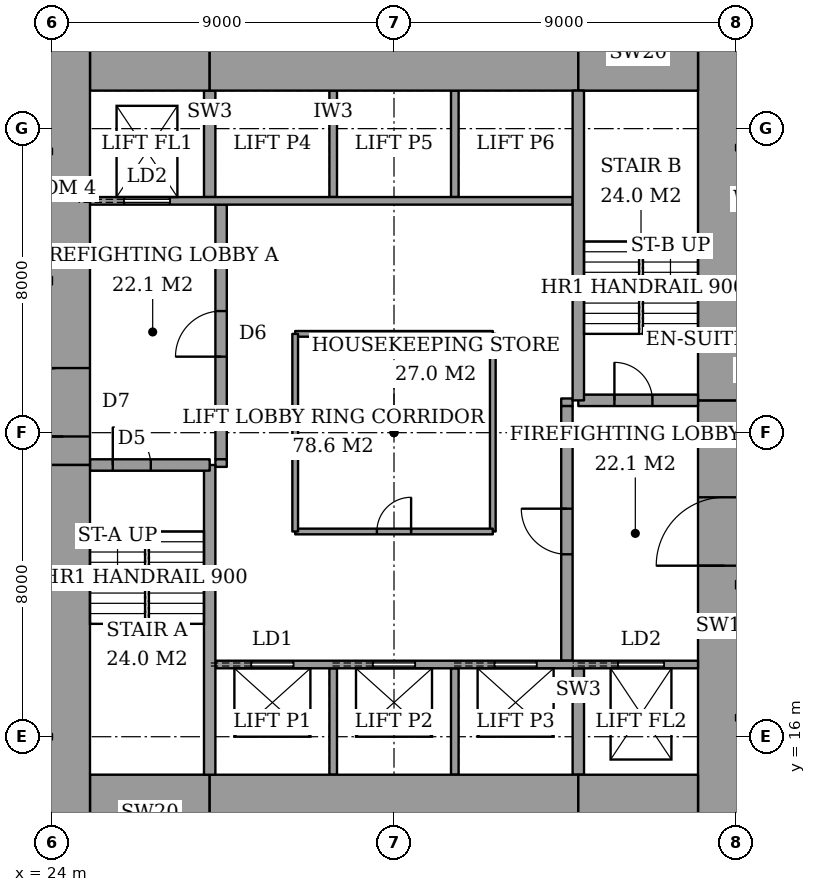
"""IFC4 building model, lengths in metres.
Left out: names, types, materials, properties, quantities, classifications, styles, units other than length and angle.
Written with IfcOpenShell. Run it as: python <this file> out.ifc"""

import sys

from ifc_helpers import new_model, si_unit, direction, frame, frame_2d, origin, place, context, subcontext, project, spatial, rectangle, extrude, element, fill, save


model = new_model("IFC4")
c1 = context("Model", 3, precision=1e-05, world=origin(), true_north=direction((0.0, 1.0)))
c2 = subcontext(c1, "Body", "Model", "MODEL_VIEW")
j1 = project(units=[si_unit("LENGTHUNIT", "METRE"), si_unit("PLANEANGLEUNIT", "RADIAN")], contexts=[c1])
p1 = place(None, origin())
s1 = spatial("IfcSite", under=j1, at=p1, CompositionType="ELEMENT")
p2 = place(p1, origin())
s2 = spatial("IfcBuilding", under=s1, at=p2, CompositionType="ELEMENT")
p3 = place(p2, frame((0.0, 0.0, 121.4)))
s3 = spatial("IfcBuildingStorey", under=s2, at=p3, CompositionType="ELEMENT", Elevation=121.4)
p4 = place(p3, frame((25.0, 14.0, 0.0), z_axis=(0.0, 0.0, 1.0), x_axis=(1.0, 0.0, 0.0)))
e1 = element("IfcWall", 1, at=p4, inside=s3, PredefinedType="SHEAR", context=c2, shape_type="SweptSolid", body=[
    extrude(rectangle(XDim=3.15, YDim=2.0, at=frame_2d((1.575, 0.0))), origin(), (0.0, 0.0, 1.0), 3.6),
])
p5 = place(p3, frame((28.15, 14.0, 0.0), z_axis=(0.0, 0.0, 1.0), x_axis=(1.0, 0.0, 0.0)))
e2 = element("IfcWall", 2, at=p5, inside=s3, PredefinedType="SHEAR", context=c2, shape_type="SweptSolid", body=[
    extrude(rectangle(XDim=9.7, YDim=2.0, at=frame_2d((4.85, 0.0))), origin(), (0.0, 0.0, 1.0), 3.6),
])
for number, where, z_axis, x_axis in (
    (3, (37.85, 14.0, 0.0), (0.0, 0.0, 1.0), (1.0, 0.0, 0.0)),
    (4, (25.0, 34.0, 0.0), (0.0, 0.0, 1.0), (1.0, 0.0, 0.0)),
):
    element("IfcWall", number, at=place(p3, frame(where, z_axis=z_axis, x_axis=x_axis)), inside=s3, PredefinedType="SHEAR", context=c2, shape_type="SweptSolid", body=[
        extrude(rectangle(XDim=3.15, YDim=2.0, at=frame_2d((1.575, 0.0))), origin(), (0.0, 0.0, 1.0), 3.6),
    ])
p6 = place(p3, frame((28.15, 34.0, 0.0), z_axis=(0.0, 0.0, 1.0), x_axis=(1.0, 0.0, 0.0)))
e5 = element("IfcWall", 5, at=p6, inside=s3, PredefinedType="SHEAR", context=c2, shape_type="SweptSolid", body=[
    extrude(rectangle(XDim=9.7, YDim=2.0, at=frame_2d((4.85, 0.0))), origin(), (0.0, 0.0, 1.0), 3.6),
])
p7 = place(p3, frame((37.85, 34.0, 0.0), z_axis=(0.0, 0.0, 1.0), x_axis=(1.0, 0.0, 0.0)))
e6 = element("IfcWall", 6, at=p7, inside=s3, PredefinedType="SHEAR", context=c2, shape_type="SweptSolid", body=[
    extrude(rectangle(XDim=3.15, YDim=2.0, at=frame_2d((1.575, 0.0))), origin(), (0.0, 0.0, 1.0), 3.6),
])
p8 = place(p3, frame((24.3, 13.0, 0.0), z_axis=(0.0, 0.0, 1.0), x_axis=(0.0, 1.0, 0.0)))
e7 = element("IfcWall", 7, at=p8, inside=s3, PredefinedType="SHEAR", context=c2, shape_type="SweptSolid", body=[
    extrude(rectangle(XDim=10.15, YDim=1.4, at=frame_2d((5.075, 0.0))), origin(), (0.0, 0.0, 1.0), 3.6),
])
p9 = place(p3, frame((24.3, 23.15, 0.0), z_axis=(0.0, 0.0, 1.0), x_axis=(0.0, 1.0, 0.0)))
e8 = element("IfcWall", 8, at=p9, inside=s3, PredefinedType="SHEAR", context=c2, shape_type="SweptSolid", body=[
    extrude(rectangle(XDim=11.85, YDim=1.4, at=frame_2d((5.925, 0.0))), origin(), (0.0, 0.0, 1.0), 3.6),
])
p10 = place(p9, frame((0.75, 0.0, 0.0)))
e9 = element("IfcOpeningElement", 9, at=p10, cuts=e8, PredefinedType="OPENING", context=c2, shape_type="SweptSolid", body=[
    extrude(rectangle(XDim=1.8, YDim=2.4, at=frame_2d((0.9, 1.2))), frame((0.0, 0.71, 0.0), z_axis=(0.0, -1.0, 0.0), x_axis=(1.0, 0.0, 0.0)), (0.0, 0.0, 1.0), 1.42),
])
p11 = place(p3, frame((41.7, 13.0, 0.0), z_axis=(0.0, 0.0, 1.0), x_axis=(0.0, 1.0, 0.0)))
e10 = element("IfcWall", 10, at=p11, inside=s3, PredefinedType="SHEAR", context=c2, shape_type="SweptSolid", body=[
    extrude(rectangle(XDim=11.85, YDim=1.4, at=frame_2d((5.925, 0.0))), origin(), (0.0, 0.0, 1.0), 3.6),
])
p12 = place(p11, frame((7.5, 0.0, 0.0)))
e11 = element("IfcOpeningElement", 11, at=p12, cuts=e10, PredefinedType="OPENING", context=c2, shape_type="SweptSolid", body=[
    extrude(rectangle(XDim=1.8, YDim=2.4, at=frame_2d((0.9, 1.2))), frame((0.0, 0.71, 0.0), z_axis=(0.0, -1.0, 0.0), x_axis=(1.0, 0.0, 0.0)), (0.0, 0.0, 1.0), 1.42),
])
p13 = place(p3, frame((41.7, 24.85, 0.0), z_axis=(0.0, 0.0, 1.0), x_axis=(0.0, 1.0, 0.0)))
e12 = element("IfcWall", 12, at=p13, inside=s3, PredefinedType="SHEAR", context=c2, shape_type="SweptSolid", body=[
    extrude(rectangle(XDim=10.15, YDim=1.4, at=frame_2d((5.075, 0.0))), origin(), (0.0, 0.0, 1.0), 3.6),
])
p14 = place(p3, frame((28.15, 15.0, 0.0), z_axis=(0.0, 0.0, 1.0), x_axis=(0.0, 1.0, 0.0)))
e13 = element("IfcWall", 13, at=p14, inside=s3, PredefinedType="SHEAR", context=c2, shape_type="SweptSolid", body=[
    extrude(rectangle(XDim=8.15, YDim=0.3, at=frame_2d((4.075, 0.0))), origin(), (0.0, 0.0, 1.0), 3.6),
])
p15 = place(p3, frame((25.0, 23.15, 0.0), z_axis=(0.0, 0.0, 1.0), x_axis=(1.0, 0.0, 0.0)))
e14 = element("IfcWall", 14, at=p15, inside=s3, PredefinedType="SHEAR", context=c2, shape_type="SweptSolid", body=[
    extrude(rectangle(XDim=3.15, YDim=0.3, at=frame_2d((1.575, 0.0))), origin(), (0.0, 0.0, 1.0), 3.6),
])
p16 = place(p15, frame((0.6, 0.0, 0.0)))
e15 = element("IfcOpeningElement", 15, at=p16, cuts=e14, PredefinedType="OPENING", context=c2, shape_type="SweptSolid", body=[
    extrude(rectangle(XDim=1.0, YDim=2.1, at=frame_2d((0.5, 1.05))), frame((0.0, 0.16, 0.0), z_axis=(0.0, -1.0, 0.0), x_axis=(1.0, 0.0, 0.0)), (0.0, 0.0, 1.0), 0.32),
])
p17 = place(p3, frame((37.85, 24.85, 0.0), z_axis=(0.0, 0.0, 1.0), x_axis=(0.0, 1.0, 0.0)))
e16 = element("IfcWall", 16, at=p17, inside=s3, PredefinedType="SHEAR", context=c2, shape_type="SweptSolid", body=[
    extrude(rectangle(XDim=8.15, YDim=0.3, at=frame_2d((4.075, 0.0))), origin(), (0.0, 0.0, 1.0), 3.6),
])
p18 = place(p3, frame((37.85, 24.85, 0.0), z_axis=(0.0, 0.0, 1.0), x_axis=(1.0, 0.0, 0.0)))
e17 = element("IfcWall", 17, at=p18, inside=s3, PredefinedType="SHEAR", context=c2, shape_type="SweptSolid", body=[
    extrude(rectangle(XDim=3.15, YDim=0.3, at=frame_2d((1.575, 0.0))), origin(), (0.0, 0.0, 1.0), 3.6),
])
p19 = place(p18, frame((0.95, 0.0, 0.0)))
e18 = element("IfcOpeningElement", 18, at=p19, cuts=e17, PredefinedType="OPENING", context=c2, shape_type="SweptSolid", body=[
    extrude(rectangle(XDim=1.0, YDim=2.1, at=frame_2d((0.5, 1.05))), frame((0.0, 0.16, 0.0), z_axis=(0.0, -1.0, 0.0), x_axis=(1.0, 0.0, 0.0)), (0.0, 0.0, 1.0), 0.32),
])
p20 = place(p3, frame((28.45, 23.3, 0.0), z_axis=(0.0, 0.0, 1.0), x_axis=(0.0, 1.0, 0.0)))
e19 = element("IfcWall", 19, at=p20, inside=s3, PredefinedType="PARTITIONING", context=c2, shape_type="SweptSolid", body=[
    extrude(rectangle(XDim=6.7, YDim=0.3, at=frame_2d((3.35, 0.0))), origin(), (0.0, 0.0, 1.0), 3.6),
])
p21 = place(p20, frame((2.7, 0.0, 0.0)))
e20 = element("IfcOpeningElement", 20, at=p21, cuts=e19, PredefinedType="OPENING", context=c2, shape_type="SweptSolid", body=[
    extrude(rectangle(XDim=1.2, YDim=2.1, at=frame_2d((0.6, 1.05))), frame((0.0, 0.16, 0.0), z_axis=(0.0, -1.0, 0.0), x_axis=(1.0, 0.0, 0.0)), (0.0, 0.0, 1.0), 0.32),
])
p22 = place(p3, frame((37.55, 18.0, 0.0), z_axis=(0.0, 0.0, 1.0), x_axis=(0.0, 1.0, 0.0)))
e21 = element("IfcWall", 21, at=p22, inside=s3, PredefinedType="PARTITIONING", context=c2, shape_type="SweptSolid", body=[
    extrude(rectangle(XDim=6.7, YDim=0.3, at=frame_2d((3.35, 0.0))), origin(), (0.0, 0.0, 1.0), 3.6),
])
p23 = place(p22, frame((2.8, 0.0, 0.0)))
e22 = element("IfcOpeningElement", 22, at=p23, cuts=e21, PredefinedType="OPENING", context=c2, shape_type="SweptSolid", body=[
    extrude(rectangle(XDim=1.2, YDim=2.1, at=frame_2d((0.6, 1.05))), frame((0.0, 0.16, 0.0), z_axis=(0.0, -1.0, 0.0), x_axis=(1.0, 0.0, 0.0)), (0.0, 0.0, 1.0), 0.32),
])
p24 = place(p3, frame((28.3, 17.9, 0.0), z_axis=(0.0, 0.0, 1.0), x_axis=(1.0, 0.0, 0.0)))
e23 = element("IfcWall", 23, at=p24, inside=s3, PredefinedType="PARTITIONING", context=c2, shape_type="SweptSolid", body=[
    extrude(rectangle(XDim=12.7, YDim=0.2, at=frame_2d((6.35, 0.0))), origin(), (0.0, 0.0, 1.0), 3.6),
])
p25 = place(p24, frame((0.95, 0.0, 0.0)))
e24 = element("IfcOpeningElement", 24, at=p25, cuts=e23, PredefinedType="OPENING", context=c2, shape_type="SweptSolid", body=[
    extrude(rectangle(XDim=1.1, YDim=2.1, at=frame_2d((0.55, 1.05))), frame((0.0, 0.11, 0.0), z_axis=(0.0, -1.0, 0.0), x_axis=(1.0, 0.0, 0.0)), (0.0, 0.0, 1.0), 0.22),
])
p26 = place(p24, frame((4.15, 0.0, 0.0)))
e25 = element("IfcOpeningElement", 25, at=p26, cuts=e23, PredefinedType="OPENING", context=c2, shape_type="SweptSolid", body=[
    extrude(rectangle(XDim=1.1, YDim=2.1, at=frame_2d((0.55, 1.05))), frame((0.0, 0.11, 0.0), z_axis=(0.0, -1.0, 0.0), x_axis=(1.0, 0.0, 0.0)), (0.0, 0.0, 1.0), 0.22),
])
p27 = place(p24, frame((7.35, 0.0, 0.0)))
e26 = element("IfcOpeningElement", 26, at=p27, cuts=e23, PredefinedType="OPENING", context=c2, shape_type="SweptSolid", body=[
    extrude(rectangle(XDim=1.1, YDim=2.1, at=frame_2d((0.55, 1.05))), frame((0.0, 0.11, 0.0), z_axis=(0.0, -1.0, 0.0), x_axis=(1.0, 0.0, 0.0)), (0.0, 0.0, 1.0), 0.22),
])
p28 = place(p24, frame((10.6, 0.0, 0.0)))
e27 = element("IfcOpeningElement", 27, at=p28, cuts=e23, PredefinedType="OPENING", context=c2, shape_type="SweptSolid", body=[
    extrude(rectangle(XDim=1.2, YDim=2.1, at=frame_2d((0.6, 1.05))), frame((0.0, 0.11, 0.0), z_axis=(0.0, -1.0, 0.0), x_axis=(1.0, 0.0, 0.0)), (0.0, 0.0, 1.0), 0.22),
])
p29 = place(p3, frame((25.0, 30.1, 0.0), z_axis=(0.0, 0.0, 1.0), x_axis=(1.0, 0.0, 0.0)))
e28 = element("IfcWall", 28, at=p29, inside=s3, PredefinedType="PARTITIONING", context=c2, shape_type="SweptSolid", body=[
    extrude(rectangle(XDim=12.7, YDim=0.2, at=frame_2d((6.35, 0.0))), origin(), (0.0, 0.0, 1.0), 3.6),
])
p30 = place(p29, frame((0.9, 0.0, 0.0)))
e29 = element("IfcOpeningElement", 29, at=p30, cuts=e28, PredefinedType="OPENING", context=c2, shape_type="SweptSolid", body=[
    extrude(rectangle(XDim=1.2, YDim=2.1, at=frame_2d((0.6, 1.05))), frame((0.0, 0.11, 0.0), z_axis=(0.0, -1.0, 0.0), x_axis=(1.0, 0.0, 0.0)), (0.0, 0.0, 1.0), 0.22),
])
for number, where, z_axis, x_axis in (
    (30, (31.4, 15.0, 0.0), (0.0, 0.0, 1.0), (0.0, 1.0, 0.0)),
    (31, (34.6, 15.0, 0.0), (0.0, 0.0, 1.0), (0.0, 1.0, 0.0)),
):
    element("IfcWall", number, at=place(p3, frame(where, z_axis=z_axis, x_axis=x_axis)), inside=s3, PredefinedType="PARTITIONING", context=c2, shape_type="SweptSolid", body=[
        extrude(rectangle(XDim=2.8, YDim=0.2, at=frame_2d((1.4, 0.0))), origin(), (0.0, 0.0, 1.0), 3.6),
    ])
p31 = place(p3, frame((37.85, 15.0, 0.0), z_axis=(0.0, 0.0, 1.0), x_axis=(0.0, 1.0, 0.0)))
e32 = element("IfcWall", 32, at=p31, inside=s3, PredefinedType="SHEAR", context=c2, shape_type="SweptSolid", body=[
    extrude(rectangle(XDim=2.8, YDim=0.3, at=frame_2d((1.4, 0.0))), origin(), (0.0, 0.0, 1.0), 3.6),
])
for number, where, z_axis, x_axis in (
    (33, (31.4, 30.2, 0.0), (0.0, 0.0, 1.0), (0.0, 1.0, 0.0)),
    (34, (34.6, 30.2, 0.0), (0.0, 0.0, 1.0), (0.0, 1.0, 0.0)),
):
    element("IfcWall", number, at=place(p3, frame(where, z_axis=z_axis, x_axis=x_axis)), inside=s3, PredefinedType="PARTITIONING", context=c2, shape_type="SweptSolid", body=[
        extrude(rectangle(XDim=2.8, YDim=0.2, at=frame_2d((1.4, 0.0))), origin(), (0.0, 0.0, 1.0), 3.6),
    ])
p32 = place(p3, frame((28.15, 30.2, 0.0), z_axis=(0.0, 0.0, 1.0), x_axis=(0.0, 1.0, 0.0)))
e35 = element("IfcWall", 35, at=p32, inside=s3, PredefinedType="SHEAR", context=c2, shape_type="SweptSolid", body=[
    extrude(rectangle(XDim=2.8, YDim=0.3, at=frame_2d((1.4, 0.0))), origin(), (0.0, 0.0, 1.0), 3.6),
])
for number, where, z_axis, x_axis in (
    (36, (28.3, 23.2, 0.0), (0.0, 0.0, 1.0), (1.0, 0.0, 0.0)),
    (37, (37.4, 24.8, 0.0), (0.0, 0.0, 1.0), (1.0, 0.0, 0.0)),
):
    element("IfcWall", number, at=place(p3, frame(where, z_axis=z_axis, x_axis=x_axis)), inside=s3, PredefinedType="PARTITIONING", context=c2, shape_type="SweptSolid", body=[
        extrude(rectangle(XDim=0.3, YDim=0.2, at=frame_2d((0.15, 0.0))), origin(), (0.0, 0.0, 1.0), 3.6),
    ])
p33 = place(p3, frame((30.4, 21.4, 0.0), z_axis=(0.0, 0.0, 1.0), x_axis=(1.0, 0.0, 0.0)))
e38 = element("IfcWall", 38, at=p33, inside=s3, PredefinedType="PARTITIONING", context=c2, shape_type="SweptSolid", body=[
    extrude(rectangle(XDim=5.2, YDim=0.15, at=frame_2d((2.6, 0.0))), origin(), (0.0, 0.0, 1.0), 3.35),
])
p34 = place(p33, frame((2.15, 0.0, 0.0)))
e39 = element("IfcOpeningElement", 39, at=p34, cuts=e38, PredefinedType="OPENING", context=c2, shape_type="SweptSolid", body=[
    extrude(rectangle(XDim=0.9, YDim=2.1, at=frame_2d((0.45, 1.05))), frame((0.0, 0.085, 0.0), z_axis=(0.0, -1.0, 0.0), x_axis=(1.0, 0.0, 0.0)), (0.0, 0.0, 1.0), 0.17),
])
for number, where, z_axis, x_axis in (
    (40, (30.4, 26.6, 0.0), (0.0, 0.0, 1.0), (1.0, 0.0, 0.0)),
    (41, (30.4, 21.4, 0.0), (0.0, 0.0, 1.0), (0.0, 1.0, 0.0)),
    (42, (35.6, 21.4, 0.0), (0.0, 0.0, 1.0), (0.0, 1.0, 0.0)),
):
    element("IfcWall", number, at=place(p3, frame(where, z_axis=z_axis, x_axis=x_axis)), inside=s3, PredefinedType="PARTITIONING", context=c2, shape_type="SweptSolid", body=[
        extrude(rectangle(XDim=5.2, YDim=0.15, at=frame_2d((2.6, 0.0))), origin(), (0.0, 0.0, 1.0), 3.35),
    ])
p35 = place(p16, origin())
e43 = element("IfcDoor", 43, at=p35, inside=s3, OperationType="SINGLE_SWING_RIGHT", PredefinedType="DOOR", context=c2, shape_type="SweptSolid", body=[
    extrude(rectangle(XDim=1.0, YDim=2.1, at=frame_2d((0.5, 1.05))), frame((0.0, 0.025, 0.0), z_axis=(0.0, -1.0, 0.0), x_axis=(1.0, 0.0, 0.0)), (0.0, 0.0, 1.0), 0.05),
])
fill(e15, e43)
p36 = place(p19, origin())
e44 = element("IfcDoor", 44, at=p36, inside=s3, OperationType="SINGLE_SWING_RIGHT", PredefinedType="DOOR", context=c2, shape_type="SweptSolid", body=[
    extrude(rectangle(XDim=1.0, YDim=2.1, at=frame_2d((0.5, 1.05))), frame((0.0, 0.025, 0.0), z_axis=(0.0, -1.0, 0.0), x_axis=(1.0, 0.0, 0.0)), (0.0, 0.0, 1.0), 0.05),
])
fill(e18, e44)
p37 = place(p21, origin())
e45 = element("IfcDoor", 45, at=p37, inside=s3, OperationType="SINGLE_SWING_RIGHT", PredefinedType="DOOR", context=c2, shape_type="SweptSolid", body=[
    extrude(rectangle(XDim=1.2, YDim=2.1, at=frame_2d((0.6, 1.05))), frame((0.0, 0.025, 0.0), z_axis=(0.0, -1.0, 0.0), x_axis=(1.0, 0.0, 0.0)), (0.0, 0.0, 1.0), 0.05),
])
fill(e20, e45)
p38 = place(p23, origin())
e46 = element("IfcDoor", 46, at=p38, inside=s3, OperationType="SINGLE_SWING_LEFT", PredefinedType="DOOR", context=c2, shape_type="SweptSolid", body=[
    extrude(rectangle(XDim=1.2, YDim=2.1, at=frame_2d((0.6, 1.05))), frame((0.0, 0.025, 0.0), z_axis=(0.0, -1.0, 0.0), x_axis=(1.0, 0.0, 0.0)), (0.0, 0.0, 1.0), 0.05),
])
fill(e22, e46)
p39 = place(p10, origin())
e47 = element("IfcDoor", 47, at=p39, inside=s3, OperationType="DOUBLE_DOOR_DOUBLE_SWING", PredefinedType="DOOR", context=c2, shape_type="SweptSolid", body=[
    extrude(rectangle(XDim=1.8, YDim=2.4, at=frame_2d((0.9, 1.2))), frame((0.0, 0.025, 0.0), z_axis=(0.0, -1.0, 0.0), x_axis=(1.0, 0.0, 0.0)), (0.0, 0.0, 1.0), 0.05),
])
fill(e9, e47)
p40 = place(p12, origin())
e48 = element("IfcDoor", 48, at=p40, inside=s3, OperationType="DOUBLE_DOOR_DOUBLE_SWING", PredefinedType="DOOR", context=c2, shape_type="SweptSolid", body=[
    extrude(rectangle(XDim=1.8, YDim=2.4, at=frame_2d((0.9, 1.2))), frame((0.0, 0.025, 0.0), z_axis=(0.0, -1.0, 0.0), x_axis=(1.0, 0.0, 0.0)), (0.0, 0.0, 1.0), 0.05),
])
fill(e11, e48)
p41 = place(p34, origin())
e49 = element("IfcDoor", 49, at=p41, inside=s3, OperationType="SINGLE_SWING_LEFT", PredefinedType="DOOR", context=c2, shape_type="SweptSolid", body=[
    extrude(rectangle(XDim=0.9, YDim=2.1, at=frame_2d((0.45, 1.05))), frame((0.0, 0.025, 0.0), z_axis=(0.0, -1.0, 0.0), x_axis=(1.0, 0.0, 0.0)), (0.0, 0.0, 1.0), 0.05),
])
fill(e39, e49)
p42 = place(p25, origin())
e50 = element("IfcDoor", 50, at=p42, inside=s3, OperationType="SLIDING_TO_LEFT", PredefinedType="DOOR", context=c2, shape_type="SweptSolid", body=[
    extrude(rectangle(XDim=1.1, YDim=2.1, at=frame_2d((0.55, 1.05))), frame((0.0, 0.025, 0.0), z_axis=(0.0, -1.0, 0.0), x_axis=(1.0, 0.0, 0.0)), (0.0, 0.0, 1.0), 0.05),
])
fill(e24, e50)
p43 = place(p26, origin())
e51 = element("IfcDoor", 51, at=p43, inside=s3, OperationType="SLIDING_TO_LEFT", PredefinedType="DOOR", context=c2, shape_type="SweptSolid", body=[
    extrude(rectangle(XDim=1.1, YDim=2.1, at=frame_2d((0.55, 1.05))), frame((0.0, 0.025, 0.0), z_axis=(0.0, -1.0, 0.0), x_axis=(1.0, 0.0, 0.0)), (0.0, 0.0, 1.0), 0.05),
])
fill(e25, e51)
p44 = place(p27, origin())
e52 = element("IfcDoor", 52, at=p44, inside=s3, OperationType="SLIDING_TO_LEFT", PredefinedType="DOOR", context=c2, shape_type="SweptSolid", body=[
    extrude(rectangle(XDim=1.1, YDim=2.1, at=frame_2d((0.55, 1.05))), frame((0.0, 0.025, 0.0), z_axis=(0.0, -1.0, 0.0), x_axis=(1.0, 0.0, 0.0)), (0.0, 0.0, 1.0), 0.05),
])
fill(e26, e52)
p45 = place(p30, origin())
e53 = element("IfcDoor", 53, at=p45, inside=s3, OperationType="SLIDING_TO_LEFT", PredefinedType="DOOR", context=c2, shape_type="SweptSolid", body=[
    extrude(rectangle(XDim=1.2, YDim=2.1, at=frame_2d((0.6, 1.05))), frame((0.0, 0.025, 0.0), z_axis=(0.0, -1.0, 0.0), x_axis=(1.0, 0.0, 0.0)), (0.0, 0.0, 1.0), 0.05),
])
fill(e29, e53)
p46 = place(p28, origin())
e54 = element("IfcDoor", 54, at=p46, inside=s3, OperationType="SLIDING_TO_LEFT", PredefinedType="DOOR", context=c2, shape_type="SweptSolid", body=[
    extrude(rectangle(XDim=1.2, YDim=2.1, at=frame_2d((0.6, 1.05))), frame((0.0, 0.025, 0.0), z_axis=(0.0, -1.0, 0.0), x_axis=(1.0, 0.0, 0.0)), (0.0, 0.0, 1.0), 0.05),
])
fill(e27, e54)
save(model, sys.argv[1])
